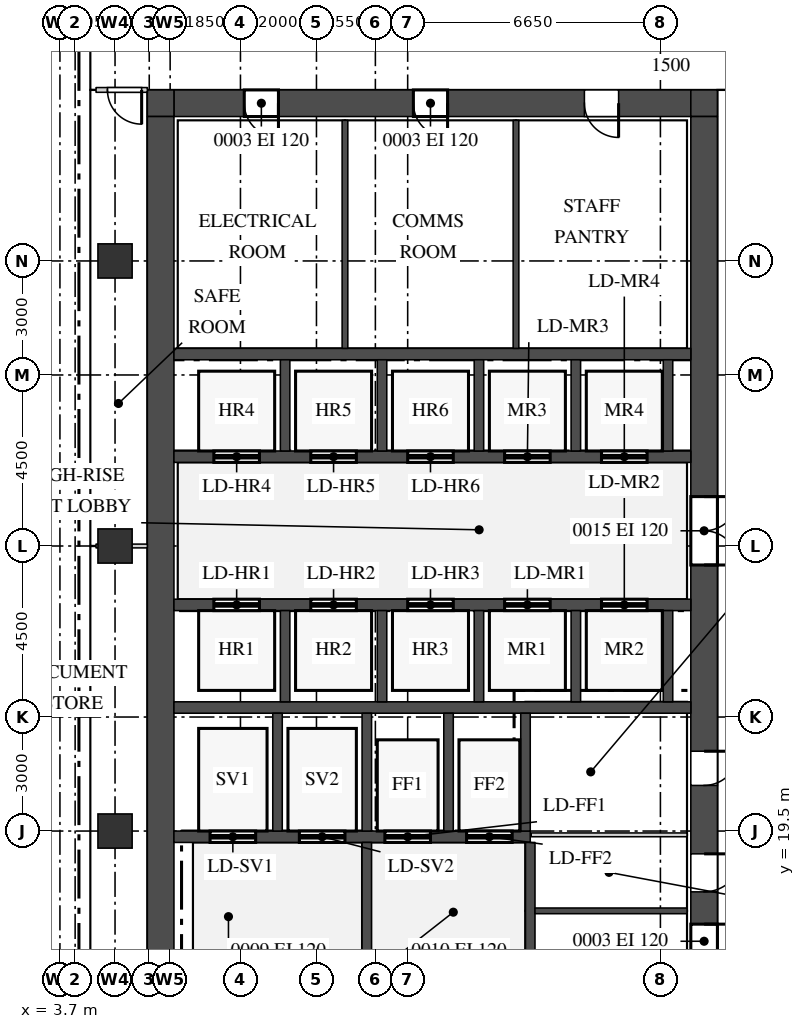
"""IFC4 building model, lengths in metres.
Left out: names, types, materials, properties, quantities, classifications, styles, units other than length and angle.
Written with IfcOpenShell. Run it as: python <this file> out.ifc"""

import sys

from ifc_helpers import new_model, si_unit, direction, frame, frame_2d, origin, origin_2d, place, context, subcontext, project, spatial, rectangle, extrude, source, transform, mapped, element, fill, save


model = new_model("IFC4")
c1 = context("Model", 3, precision=1e-05, world=origin(), true_north=direction((0.0, 1.0)))
c2 = subcontext(c1, "Body", "Model", "MODEL_VIEW")
j1 = project(units=[si_unit("LENGTHUNIT", "METRE"), si_unit("PLANEANGLEUNIT", "RADIAN")], contexts=[c1])
p1 = place(None, origin())
s1 = spatial("IfcSite", under=j1, at=p1, CompositionType="ELEMENT")
p2 = place(p1, origin())
s2 = spatial("IfcBuilding", under=s1, at=p2, CompositionType="ELEMENT")
p3 = place(p2, frame((0.0, 0.0, 234.2)))
s3 = spatial("IfcBuildingStorey", under=s2, at=p3, CompositionType="ELEMENT", Elevation=234.2)
m1 = source(origin(), c2, "Body", "SweptSolid", [
    extrude(rectangle(XDim=13.6, YDim=0.7, at=frame_2d((6.8, 0.0))), origin(), (0.0, 0.0, 1.0), 3.75),
])
p4 = place(p3, frame((6.7, 38.65, 0.0), z_axis=(0.0, 0.0, 1.0), x_axis=(1.0, 0.0, 0.0)))
e1 = element("IfcWall", 1, at=p4, inside=s3, PredefinedType="SHEAR", context=c2, shape_type="MappedRepresentation", body=[
    mapped(m1, transform((0.0, 0.0, 0.0))),
])
m2 = source(origin(), c2, "Body", "SweptSolid", [
    extrude(rectangle(XDim=0.9, YDim=2.1, at=frame_2d((0.45, 1.05))), frame((0.0, 0.36, 0.0), z_axis=(0.0, -1.0, 0.0), x_axis=(1.0, 0.0, 0.0)), (0.0, 0.0, 1.0), 0.72),
])
p5 = place(p4, frame((1.85, 0.0, 0.0)))
e2 = element("IfcOpeningElement", 2, at=p5, cuts=e1, PredefinedType="OPENING", context=c2, shape_type="MappedRepresentation", body=[
    mapped(m2, transform((0.0, 0.0, 0.0))),
])
p6 = place(p4, frame((6.3, 0.0, 0.0)))
e3 = element("IfcOpeningElement", 3, at=p6, cuts=e1, PredefinedType="OPENING", context=c2, shape_type="MappedRepresentation", body=[
    mapped(m2, transform((0.0, 0.0, 0.0))),
])
p7 = place(p4, frame((10.8, 0.0, 0.0)))
e4 = element("IfcOpeningElement", 4, at=p7, cuts=e1, PredefinedType="OPENING", context=c2, shape_type="MappedRepresentation", body=[
    mapped(m2, transform((0.0, 0.0, 0.0))),
])
m3 = source(origin(), c2, "Body", "SweptSolid", [
    extrude(rectangle(XDim=0.7, YDim=0.7, at=frame_2d((0.35, 0.0))), origin(), (0.0, 0.0, 1.0), 3.75),
])
for number, where, z_axis, x_axis in (
    (5, (20.3, 38.65, 0.0), (0.0, 0.0, 1.0), (1.0, 0.0, 0.0)),
    (6, (6.0, 38.65, 0.0), (0.0, 0.0, 1.0), (1.0, 0.0, 0.0)),
):
    element("IfcWall", number, at=place(p3, frame(where, z_axis=z_axis, x_axis=x_axis)), inside=s3, PredefinedType="SHEAR", context=c2, shape_type="MappedRepresentation", body=[
        mapped(m3, transform((0.0, 0.0, 0.0))),
    ])
m4 = source(origin(), c2, "Body", "SweptSolid", [
    extrude(rectangle(XDim=22.6, YDim=0.7, at=frame_2d((11.3, 0.0))), origin(), (0.0, 0.0, 1.0), 3.75),
])
p8 = place(p3, frame((20.65, 15.7, 0.0), z_axis=(0.0, 0.0, 1.0), x_axis=(0.0, 1.0, 0.0)))
e7 = element("IfcWall", 7, at=p8, inside=s3, PredefinedType="SHEAR", context=c2, shape_type="MappedRepresentation", body=[
    mapped(m4, transform((0.0, 0.0, 0.0))),
])
m5 = source(origin(), c2, "Body", "SweptSolid", [
    extrude(rectangle(XDim=1.8, YDim=2.1, at=frame_2d((0.9, 1.05))), frame((0.0, 0.36, 0.0), z_axis=(0.0, -1.0, 0.0), x_axis=(1.0, 0.0, 0.0)), (0.0, 0.0, 1.0), 0.72),
])
p9 = place(p8, frame((10.8, 0.0, 0.0)))
e8 = element("IfcOpeningElement", 8, at=p9, cuts=e7, PredefinedType="OPENING", context=c2, shape_type="MappedRepresentation", body=[
    mapped(m5, transform((0.0, 0.0, 0.0))),
])
p10 = place(p8, frame((0.45, 0.0, 0.0)))
e9 = element("IfcOpeningElement", 9, at=p10, cuts=e7, PredefinedType="OPENING", context=c2, shape_type="MappedRepresentation", body=[
    mapped(m2, transform((0.0, 0.0, 0.0))),
])
m6 = source(origin(), c2, "Body", "SweptSolid", [
    extrude(rectangle(XDim=1.0, YDim=2.1, at=frame_2d((0.5, 1.05))), frame((0.0, 0.36, 0.0), z_axis=(0.0, -1.0, 0.0), x_axis=(1.0, 0.0, 0.0)), (0.0, 0.0, 1.0), 0.72),
])
p11 = place(p8, frame((2.2, 0.0, 0.0)))
e10 = element("IfcOpeningElement", 10, at=p11, cuts=e7, PredefinedType="OPENING", context=c2, shape_type="MappedRepresentation", body=[
    mapped(m6, transform((0.0, 0.0, 0.0))),
])
p12 = place(p8, frame((5.0, 0.0, 0.0)))
e11 = element("IfcOpeningElement", 11, at=p12, cuts=e7, PredefinedType="OPENING", context=c2, shape_type="MappedRepresentation", body=[
    mapped(m2, transform((0.0, 0.0, 0.0))),
])
p13 = place(p3, frame((6.35, 15.7, 0.0), z_axis=(0.0, 0.0, 1.0), x_axis=(0.0, 1.0, 0.0)))
e12 = element("IfcWall", 12, at=p13, inside=s3, PredefinedType="SHEAR", context=c2, shape_type="MappedRepresentation", body=[
    mapped(m4, transform((0.0, 0.0, 0.0))),
])
m7 = source(origin(), c2, "Body", "SweptSolid", [
    extrude(rectangle(XDim=13.6, YDim=0.3, at=frame_2d((6.8, 0.0))), origin(), (0.0, 0.0, 1.0), 3.75),
])
p14 = place(p3, frame((6.7, 22.75, 0.0), z_axis=(0.0, 0.0, 1.0), x_axis=(1.0, 0.0, 0.0)))
e13 = element("IfcWall", 13, at=p14, inside=s3, PredefinedType="STANDARD", context=c2, shape_type="MappedRepresentation", body=[
    mapped(m7, transform((0.0, 0.0, 0.0))),
])
m8 = source(origin(), c2, "Body", "SweptSolid", [
    extrude(rectangle(XDim=9.375, YDim=0.3, at=frame_2d((4.688, 0.0))), origin(), (0.0, 0.0, 1.0), 3.75),
])
p15 = place(p3, frame((6.7, 19.35, 0.0), z_axis=(0.0, 0.0, 1.0), x_axis=(1.0, 0.0, 0.0)))
e14 = element("IfcWall", 14, at=p15, inside=s3, PredefinedType="STANDARD", context=c2, shape_type="MappedRepresentation", body=[
    mapped(m8, transform((0.0, 0.0, 0.0))),
])
m9 = source(origin(), c2, "Body", "SweptSolid", [
    extrude(rectangle(XDim=1.2, YDim=2.1, at=frame_2d((0.6, 1.05))), frame((0.0, 0.16, 0.0), z_axis=(0.0, -1.0, 0.0), x_axis=(1.0, 0.0, 0.0)), (0.0, 0.0, 1.0), 0.32),
])
p16 = place(p15, frame((0.95, 0.0, 0.0)))
e15 = element("IfcOpeningElement", 15, at=p16, cuts=e14, PredefinedType="OPENING", context=c2, shape_type="MappedRepresentation", body=[
    mapped(m9, transform((0.0, 0.0, 0.0))),
])
p17 = place(p15, frame((3.3, 0.0, 0.0)))
e16 = element("IfcOpeningElement", 16, at=p17, cuts=e14, PredefinedType="OPENING", context=c2, shape_type="MappedRepresentation", body=[
    mapped(m9, transform((0.0, 0.0, 0.0))),
])
p18 = place(p15, frame((5.55, 0.0, 0.0)))
e17 = element("IfcOpeningElement", 17, at=p18, cuts=e14, PredefinedType="OPENING", context=c2, shape_type="MappedRepresentation", body=[
    mapped(m9, transform((0.0, 0.0, 0.0))),
])
p19 = place(p15, frame((7.7, 0.0, 0.0)))
e18 = element("IfcOpeningElement", 18, at=p19, cuts=e14, PredefinedType="OPENING", context=c2, shape_type="MappedRepresentation", body=[
    mapped(m9, transform((0.0, 0.0, 0.0))),
])
p20 = place(p3, frame((6.7, 32.05, 0.0), z_axis=(0.0, 0.0, 1.0), x_axis=(1.0, 0.0, 0.0)))
e19 = element("IfcWall", 19, at=p20, inside=s3, PredefinedType="STANDARD", context=c2, shape_type="MappedRepresentation", body=[
    mapped(m7, transform((0.0, 0.0, 0.0))),
])
p21 = place(p3, frame((6.7, 29.35, 0.0), z_axis=(0.0, 0.0, 1.0), x_axis=(1.0, 0.0, 0.0)))
e20 = element("IfcWall", 20, at=p21, inside=s3, PredefinedType="STANDARD", context=c2, shape_type="MappedRepresentation", body=[
    mapped(m7, transform((0.0, 0.0, 0.0))),
])
p22 = place(p21, frame((1.05, 0.0, 0.0)))
e21 = element("IfcOpeningElement", 21, at=p22, cuts=e20, PredefinedType="OPENING", context=c2, shape_type="MappedRepresentation", body=[
    mapped(m9, transform((0.0, 0.0, 0.0))),
])
p23 = place(p21, frame((3.6, 0.0, 0.0)))
e22 = element("IfcOpeningElement", 22, at=p23, cuts=e20, PredefinedType="OPENING", context=c2, shape_type="MappedRepresentation", body=[
    mapped(m9, transform((0.0, 0.0, 0.0))),
])
p24 = place(p21, frame((6.15, 0.0, 0.0)))
e23 = element("IfcOpeningElement", 23, at=p24, cuts=e20, PredefinedType="OPENING", context=c2, shape_type="MappedRepresentation", body=[
    mapped(m9, transform((0.0, 0.0, 0.0))),
])
p25 = place(p21, frame((8.7, 0.0, 0.0)))
e24 = element("IfcOpeningElement", 24, at=p25, cuts=e20, PredefinedType="OPENING", context=c2, shape_type="MappedRepresentation", body=[
    mapped(m9, transform((0.0, 0.0, 0.0))),
])
p26 = place(p21, frame((11.25, 0.0, 0.0)))
e25 = element("IfcOpeningElement", 25, at=p26, cuts=e20, PredefinedType="OPENING", context=c2, shape_type="MappedRepresentation", body=[
    mapped(m9, transform((0.0, 0.0, 0.0))),
])
p27 = place(p3, frame((6.7, 25.45, 0.0), z_axis=(0.0, 0.0, 1.0), x_axis=(1.0, 0.0, 0.0)))
e26 = element("IfcWall", 26, at=p27, inside=s3, PredefinedType="STANDARD", context=c2, shape_type="MappedRepresentation", body=[
    mapped(m7, transform((0.0, 0.0, 0.0))),
])
p28 = place(p27, frame((1.05, 0.0, 0.0)))
e27 = element("IfcOpeningElement", 27, at=p28, cuts=e26, PredefinedType="OPENING", context=c2, shape_type="MappedRepresentation", body=[
    mapped(m9, transform((0.0, 0.0, 0.0))),
])
p29 = place(p27, frame((3.6, 0.0, 0.0)))
e28 = element("IfcOpeningElement", 28, at=p29, cuts=e26, PredefinedType="OPENING", context=c2, shape_type="MappedRepresentation", body=[
    mapped(m9, transform((0.0, 0.0, 0.0))),
])
p30 = place(p27, frame((6.15, 0.0, 0.0)))
e29 = element("IfcOpeningElement", 29, at=p30, cuts=e26, PredefinedType="OPENING", context=c2, shape_type="MappedRepresentation", body=[
    mapped(m9, transform((0.0, 0.0, 0.0))),
])
p31 = place(p27, frame((8.7, 0.0, 0.0)))
e30 = element("IfcOpeningElement", 30, at=p31, cuts=e26, PredefinedType="OPENING", context=c2, shape_type="MappedRepresentation", body=[
    mapped(m9, transform((0.0, 0.0, 0.0))),
])
p32 = place(p27, frame((11.25, 0.0, 0.0)))
e31 = element("IfcOpeningElement", 31, at=p32, cuts=e26, PredefinedType="OPENING", context=c2, shape_type="MappedRepresentation", body=[
    mapped(m9, transform((0.0, 0.0, 0.0))),
])
m10 = source(origin(), c2, "Body", "SweptSolid", [
    extrude(rectangle(XDim=3.1, YDim=0.25, at=frame_2d((1.55, 0.0))), origin(), (0.0, 0.0, 1.0), 3.75),
])
for number, where, z_axis, x_axis in (
    (32, (9.425, 19.5, 0.0), (0.0, 0.0, 1.0), (0.0, 1.0, 0.0)),
    (33, (11.775, 19.5, 0.0), (0.0, 0.0, 1.0), (0.0, 1.0, 0.0)),
    (34, (13.925, 19.5, 0.0), (0.0, 0.0, 1.0), (0.0, 1.0, 0.0)),
    (35, (15.95, 19.5, 0.0), (0.0, 0.0, 1.0), (0.0, 1.0, 0.0)),
):
    element("IfcWall", number, at=place(p3, frame(where, z_axis=z_axis, x_axis=x_axis)), inside=s3, PredefinedType="STANDARD", context=c2, shape_type="MappedRepresentation", body=[
        mapped(m10, transform((0.0, 0.0, 0.0))),
    ])
m11 = source(origin(), c2, "Body", "SweptSolid", [
    extrude(rectangle(XDim=2.4, YDim=0.25, at=frame_2d((1.2, 0.0))), origin(), (0.0, 0.0, 1.0), 3.75),
])
for number, where, z_axis, x_axis in (
    (36, (17.275, 29.5, 0.0), (0.0, 0.0, 1.0), (0.0, 1.0, 0.0)),
    (37, (19.7, 29.5, 0.0), (0.0, 0.0, 1.0), (0.0, 1.0, 0.0)),
    (38, (9.625, 29.5, 0.0), (0.0, 0.0, 1.0), (0.0, 1.0, 0.0)),
    (39, (12.175, 29.5, 0.0), (0.0, 0.0, 1.0), (0.0, 1.0, 0.0)),
    (40, (14.725, 29.5, 0.0), (0.0, 0.0, 1.0), (0.0, 1.0, 0.0)),
):
    element("IfcWall", number, at=place(p3, frame(where, z_axis=z_axis, x_axis=x_axis)), inside=s3, PredefinedType="STANDARD", context=c2, shape_type="MappedRepresentation", body=[
        mapped(m11, transform((0.0, 0.0, 0.0))),
    ])
m12 = source(origin(), c2, "Body", "SweptSolid", [
    extrude(rectangle(XDim=2.4, YDim=0.25, at=frame_2d((1.2, 0.0))), origin(), (0.0, 0.0, 1.0), 3.75),
])
for number, where, z_axis, x_axis in (
    (41, (17.275, 22.9, 0.0), (0.0, 0.0, 1.0), (0.0, 1.0, 0.0)),
    (42, (19.7, 22.9, 0.0), (0.0, 0.0, 1.0), (0.0, 1.0, 0.0)),
    (43, (9.625, 22.9, 0.0), (0.0, 0.0, 1.0), (0.0, 1.0, 0.0)),
    (44, (12.175, 22.9, 0.0), (0.0, 0.0, 1.0), (0.0, 1.0, 0.0)),
    (45, (14.725, 22.9, 0.0), (0.0, 0.0, 1.0), (0.0, 1.0, 0.0)),
):
    element("IfcWall", number, at=place(p3, frame(where, z_axis=z_axis, x_axis=x_axis)), inside=s3, PredefinedType="STANDARD", context=c2, shape_type="MappedRepresentation", body=[
        mapped(m12, transform((0.0, 0.0, 0.0))),
    ])
m13 = source(origin(), c2, "Body", "SweptSolid", [
    extrude(rectangle(XDim=3.5, YDim=0.25, at=frame_2d((1.75, 0.0))), origin(), (0.0, 0.0, 1.0), 3.75),
])
for number, where, z_axis, x_axis in (
    (46, (16.075, 15.7, 0.0), (0.0, 0.0, 1.0), (0.0, 1.0, 0.0)),
    (47, (11.775, 15.7, 0.0), (0.0, 0.0, 1.0), (0.0, 1.0, 0.0)),
):
    element("IfcWall", number, at=place(p3, frame(where, z_axis=z_axis, x_axis=x_axis)), inside=s3, PredefinedType="STANDARD", context=c2, shape_type="MappedRepresentation", body=[
        mapped(m13, transform((0.0, 0.0, 0.0))),
    ])
m14 = source(origin(), c2, "Body", "SweptSolid", [
    extrude(rectangle(XDim=0.9, YDim=0.9, at=origin_2d()), origin(), (0.0, 0.0, 1.0), 3.75),
])
for number, where, z_axis, x_axis in (
    (48, (5.15, 19.5, 0.0), (0.0, 0.0, 1.0), (1.0, 0.0, 0.0)),
    (49, (5.15, 27.0, 0.0), (0.0, 0.0, 1.0), (1.0, 0.0, 0.0)),
    (50, (5.15, 34.5, 0.0), (0.0, 0.0, 1.0), (1.0, 0.0, 0.0)),
):
    element("IfcColumn", number, at=place(p3, frame(where, z_axis=z_axis, x_axis=x_axis)), inside=s3, PredefinedType="COLUMN", context=c2, shape_type="MappedRepresentation", body=[
        mapped(m14, transform((0.0, 0.0, 0.0))),
    ])
m15 = source(origin(), c2, "Body", "SweptSolid", [
    extrude(rectangle(XDim=4.0, YDim=0.15, at=frame_2d((2.0, 0.0))), origin(), (0.0, 0.0, 1.0), 3.8),
])
p33 = place(p3, frame((16.2, 17.4, 0.0), z_axis=(0.0, 0.0, 1.0), x_axis=(1.0, 0.0, 0.0)))
e51 = element("IfcWall", 51, at=p33, inside=s3, PredefinedType="PARTITIONING", context=c2, shape_type="MappedRepresentation", body=[
    mapped(m15, transform((0.0, 0.0, 0.0))),
])
m16 = source(origin(), c2, "Body", "SweptSolid", [
    extrude(rectangle(XDim=4.1, YDim=0.1, at=frame_2d((2.05, 0.0))), origin(), (0.0, 0.0, 1.0), 3.8),
])
p34 = place(p3, frame((16.1, 19.4, 0.0), z_axis=(0.0, 0.0, 1.0), x_axis=(1.0, 0.0, 0.0)))
e52 = element("IfcWall", 52, at=p34, inside=s3, PredefinedType="PARTITIONING", context=c2, shape_type="MappedRepresentation", body=[
    mapped(m16, transform((0.0, 0.0, 0.0))),
])
m17 = source(origin(), c2, "Body", "SweptSolid", [
    extrude(rectangle(XDim=1.35, YDim=0.1, at=frame_2d((0.675, 0.0))), origin(), (0.0, 0.0, 1.0), 3.8),
])
p35 = place(p3, frame((4.65, 27.0, 0.0), z_axis=(0.0, 0.0, 1.0), x_axis=(1.0, 0.0, 0.0)))
e53 = element("IfcWall", 53, at=p35, inside=s3, PredefinedType="PARTITIONING", context=c2, shape_type="MappedRepresentation", body=[
    mapped(m17, transform((0.0, 0.0, 0.0))),
])
m18 = source(origin(), c2, "Body", "SweptSolid", [
    extrude(rectangle(XDim=6.0, YDim=0.15, at=frame_2d((3.0, 0.0))), origin(), (0.0, 0.0, 1.0), 3.8),
])
for number, where, z_axis, x_axis in (
    (54, (11.2, 32.2, 0.0), (0.0, 0.0, 1.0), (0.0, 1.0, 0.0)),
    (55, (15.7, 32.2, 0.0), (0.0, 0.0, 1.0), (0.0, 1.0, 0.0)),
):
    element("IfcWall", number, at=place(p3, frame(where, z_axis=z_axis, x_axis=x_axis)), inside=s3, PredefinedType="PARTITIONING", context=c2, shape_type="MappedRepresentation", body=[
        mapped(m18, transform((0.0, 0.0, 0.0))),
    ])
m19 = source(origin(), c2, "Body", "SweptSolid", [
    extrude(rectangle(XDim=1.35, YDim=0.125, at=frame_2d((0.675, 0.0))), origin(), (0.0, 0.0, 1.0), 3.8),
])
p36 = place(p3, frame((4.65, 39.0, 0.0), z_axis=(0.0, 0.0, 1.0), x_axis=(1.0, 0.0, 0.0)))
e56 = element("IfcWall", 56, at=p36, inside=s3, PredefinedType="PARTITIONING", context=c2, shape_type="MappedRepresentation", body=[
    mapped(m19, transform((0.0, 0.0, 0.0))),
])
m20 = source(origin(), c2, "Body", "SweptSolid", [
    extrude(rectangle(XDim=0.9, YDim=2.1, at=frame_2d((0.45, 1.05))), frame((0.0, 0.073, 0.0), z_axis=(0.0, -1.0, 0.0), x_axis=(1.0, 0.0, 0.0)), (0.0, 0.0, 1.0), 0.145),
])
p37 = place(p36, frame((0.3, 0.0, 0.0)))
e57 = element("IfcOpeningElement", 57, at=p37, cuts=e56, PredefinedType="OPENING", context=c2, shape_type="MappedRepresentation", body=[
    mapped(m20, transform((0.0, 0.0, 0.0))),
])
m21 = source(origin(), c2, "Body", "SweptSolid", [
    extrude(rectangle(XDim=1.8, YDim=2.1, at=frame_2d((0.9, 1.05))), frame((0.0, 0.3, 0.0), z_axis=(0.0, -1.0, 0.0), x_axis=(1.0, 0.0, 0.0)), (0.0, 0.0, 1.0), 0.6),
])
p38 = place(p9, origin())
e58 = element("IfcDoor", 58, at=p38, inside=s3, OperationType="DOUBLE_DOOR_SINGLE_SWING", PredefinedType="DOOR", context=c2, shape_type="MappedRepresentation", body=[
    mapped(m21, transform((0.0, 0.0, 0.0))),
])
fill(e8, e58)
m22 = source(origin(), c2, "Body", "SweptSolid", [
    extrude(rectangle(XDim=0.9, YDim=2.1, at=frame_2d((0.45, 1.05))), frame((0.0, 0.3, 0.0), z_axis=(0.0, -1.0, 0.0), x_axis=(1.0, 0.0, 0.0)), (0.0, 0.0, 1.0), 0.6),
])
p39 = place(p5, origin())
e59 = element("IfcDoor", 59, at=p39, inside=s3, OperationType="SINGLE_SWING_RIGHT", PredefinedType="DOOR", context=c2, shape_type="MappedRepresentation", body=[
    mapped(m22, transform((0.0, 0.0, 0.0))),
])
fill(e2, e59)
p40 = place(p6, origin())
e60 = element("IfcDoor", 60, at=p40, inside=s3, OperationType="SINGLE_SWING_RIGHT", PredefinedType="DOOR", context=c2, shape_type="MappedRepresentation", body=[
    mapped(m22, transform((0.0, 0.0, 0.0))),
])
fill(e3, e60)
p41 = place(p7, origin())
e61 = element("IfcDoor", 61, at=p41, inside=s3, OperationType="SINGLE_SWING_RIGHT", PredefinedType="DOOR", context=c2, shape_type="MappedRepresentation", body=[
    mapped(m22, transform((0.0, 0.0, 0.0))),
])
fill(e4, e61)
p42 = place(p10, origin())
e62 = element("IfcDoor", 62, at=p42, inside=s3, OperationType="SINGLE_SWING_RIGHT", PredefinedType="DOOR", context=c2, shape_type="MappedRepresentation", body=[
    mapped(m22, transform((0.0, 0.0, 0.0))),
])
fill(e9, e62)
m23 = source(origin(), c2, "Body", "SweptSolid", [
    extrude(rectangle(XDim=1.0, YDim=2.1, at=frame_2d((0.5, 1.05))), frame((0.0, 0.3, 0.0), z_axis=(0.0, -1.0, 0.0), x_axis=(1.0, 0.0, 0.0)), (0.0, 0.0, 1.0), 0.6),
])
p43 = place(p11, origin())
e63 = element("IfcDoor", 63, at=p43, inside=s3, OperationType="SINGLE_SWING_RIGHT", PredefinedType="DOOR", context=c2, shape_type="MappedRepresentation", body=[
    mapped(m23, transform((0.0, 0.0, 0.0))),
])
fill(e10, e63)
p44 = place(p12, origin())
e64 = element("IfcDoor", 64, at=p44, inside=s3, OperationType="SINGLE_SWING_RIGHT", PredefinedType="DOOR", context=c2, shape_type="MappedRepresentation", body=[
    mapped(m22, transform((0.0, 0.0, 0.0))),
])
fill(e11, e64)
m24 = source(origin(), c2, "Body", "SweptSolid", [
    extrude(rectangle(XDim=0.9, YDim=2.1, at=frame_2d((0.45, 1.05))), frame((0.0, 0.025, 0.0), z_axis=(0.0, -1.0, 0.0), x_axis=(1.0, 0.0, 0.0)), (0.0, 0.0, 1.0), 0.05),
])
p45 = place(p37, origin())
e65 = element("IfcDoor", 65, at=p45, inside=s3, OperationType="SINGLE_SWING_RIGHT", PredefinedType="DOOR", context=c2, shape_type="MappedRepresentation", body=[
    mapped(m24, transform((0.0, 0.0, 0.0))),
])
fill(e57, e65)
m25 = source(origin(), c2, "Body", "SweptSolid", [
    extrude(rectangle(XDim=1.2, YDim=2.1, at=frame_2d((0.6, 1.05))), frame((0.0, 0.025, 0.0), z_axis=(0.0, -1.0, 0.0), x_axis=(1.0, 0.0, 0.0)), (0.0, 0.0, 1.0), 0.05),
])
p46 = place(p28, origin())
e66 = element("IfcDoor", 66, at=p46, inside=s3, OperationType="DOUBLE_DOOR_SLIDING", PredefinedType="DOOR", context=c2, shape_type="MappedRepresentation", body=[
    mapped(m25, transform((0.0, 0.0, 0.0))),
])
fill(e27, e66)
p47 = place(p29, origin())
e67 = element("IfcDoor", 67, at=p47, inside=s3, OperationType="DOUBLE_DOOR_SLIDING", PredefinedType="DOOR", context=c2, shape_type="MappedRepresentation", body=[
    mapped(m25, transform((0.0, 0.0, 0.0))),
])
fill(e28, e67)
p48 = place(p30, origin())
e68 = element("IfcDoor", 68, at=p48, inside=s3, OperationType="DOUBLE_DOOR_SLIDING", PredefinedType="DOOR", context=c2, shape_type="MappedRepresentation", body=[
    mapped(m25, transform((0.0, 0.0, 0.0))),
])
fill(e29, e68)
p49 = place(p31, origin())
e69 = element("IfcDoor", 69, at=p49, inside=s3, OperationType="DOUBLE_DOOR_SLIDING", PredefinedType="DOOR", context=c2, shape_type="MappedRepresentation", body=[
    mapped(m25, transform((0.0, 0.0, 0.0))),
])
fill(e30, e69)
p50 = place(p32, origin())
e70 = element("IfcDoor", 70, at=p50, inside=s3, OperationType="DOUBLE_DOOR_SLIDING", PredefinedType="DOOR", context=c2, shape_type="MappedRepresentation", body=[
    mapped(m25, transform((0.0, 0.0, 0.0))),
])
fill(e31, e70)
p51 = place(p22, origin())
e71 = element("IfcDoor", 71, at=p51, inside=s3, OperationType="DOUBLE_DOOR_SLIDING", PredefinedType="DOOR", context=c2, shape_type="MappedRepresentation", body=[
    mapped(m25, transform((0.0, 0.0, 0.0))),
])
fill(e21, e71)
p52 = place(p23, origin())
e72 = element("IfcDoor", 72, at=p52, inside=s3, OperationType="DOUBLE_DOOR_SLIDING", PredefinedType="DOOR", context=c2, shape_type="MappedRepresentation", body=[
    mapped(m25, transform((0.0, 0.0, 0.0))),
])
fill(e22, e72)
p53 = place(p24, origin())
e73 = element("IfcDoor", 73, at=p53, inside=s3, OperationType="DOUBLE_DOOR_SLIDING", PredefinedType="DOOR", context=c2, shape_type="MappedRepresentation", body=[
    mapped(m25, transform((0.0, 0.0, 0.0))),
])
fill(e23, e73)
p54 = place(p25, origin())
e74 = element("IfcDoor", 74, at=p54, inside=s3, OperationType="DOUBLE_DOOR_SLIDING", PredefinedType="DOOR", context=c2, shape_type="MappedRepresentation", body=[
    mapped(m25, transform((0.0, 0.0, 0.0))),
])
fill(e24, e74)
p55 = place(p26, origin())
e75 = element("IfcDoor", 75, at=p55, inside=s3, OperationType="DOUBLE_DOOR_SLIDING", PredefinedType="DOOR", context=c2, shape_type="MappedRepresentation", body=[
    mapped(m25, transform((0.0, 0.0, 0.0))),
])
fill(e25, e75)
p56 = place(p16, origin())
e76 = element("IfcDoor", 76, at=p56, inside=s3, OperationType="DOUBLE_DOOR_SLIDING", PredefinedType="DOOR", context=c2, shape_type="MappedRepresentation", body=[
    mapped(m25, transform((0.0, 0.0, 0.0))),
])
fill(e15, e76)
p57 = place(p17, origin())
e77 = element("IfcDoor", 77, at=p57, inside=s3, OperationType="DOUBLE_DOOR_SLIDING", PredefinedType="DOOR", context=c2, shape_type="MappedRepresentation", body=[
    mapped(m25, transform((0.0, 0.0, 0.0))),
])
fill(e16, e77)
p58 = place(p18, origin())
e78 = element("IfcDoor", 78, at=p58, inside=s3, OperationType="DOUBLE_DOOR_SLIDING", PredefinedType="DOOR", context=c2, shape_type="MappedRepresentation", body=[
    mapped(m25, transform((0.0, 0.0, 0.0))),
])
fill(e17, e78)
p59 = place(p19, origin())
e79 = element("IfcDoor", 79, at=p59, inside=s3, OperationType="DOUBLE_DOOR_SLIDING", PredefinedType="DOOR", context=c2, shape_type="MappedRepresentation", body=[
    mapped(m25, transform((0.0, 0.0, 0.0))),
])
fill(e18, e79)
save(model, sys.argv[1])
